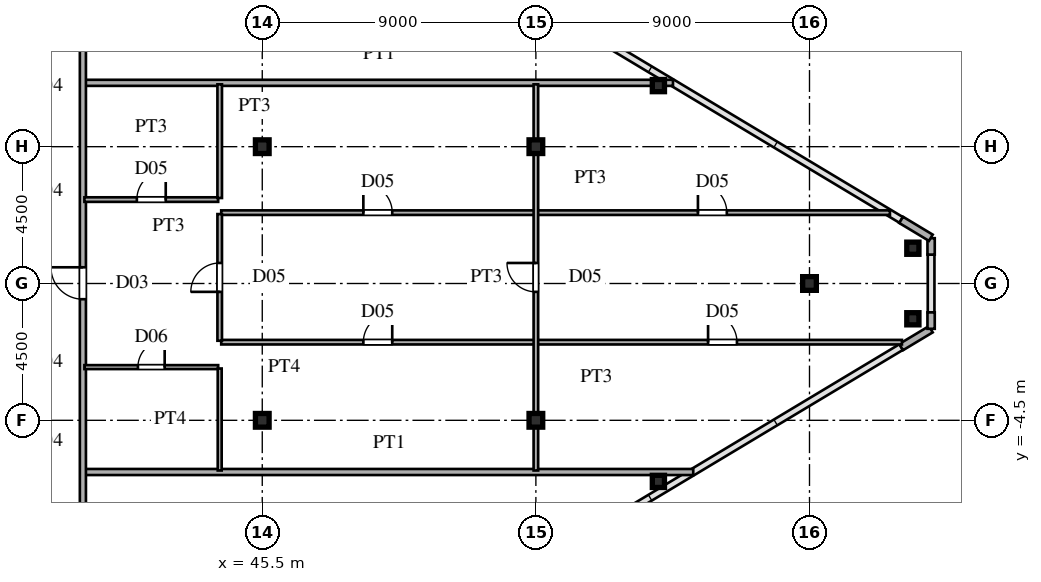
"""IFC4 building model, lengths in metres.
Left out: names, types, materials, properties, quantities, classifications, styles, units other than length and angle.
Written with IfcOpenShell. Run it as: python <this file> out.ifc"""

import sys

from ifc_helpers import new_model, si_unit, direction, frame, frame_2d, origin, origin_2d, place, context, subcontext, project, spatial, rectangle, hollow_rectangle, i_section, extrude, source, transform, mapped, element, fill, save


model = new_model("IFC4")
c1 = context("Model", 3, precision=1e-05, world=origin(), true_north=direction((0.0, 1.0)))
c2 = subcontext(c1, "Body", "Model", "MODEL_VIEW")
j1 = project(units=[si_unit("LENGTHUNIT", "METRE"), si_unit("PLANEANGLEUNIT", "RADIAN")], contexts=[c1])
p1 = place(None, origin())
s1 = spatial("IfcSite", under=j1, at=p1, CompositionType="ELEMENT")
p2 = place(p1, origin())
s2 = spatial("IfcBuilding", under=s1, at=p2, CompositionType="ELEMENT")
p3 = place(p2, frame((0.0, 0.0, 239.4)))
s3 = spatial("IfcBuildingStorey", under=s2, at=p3, CompositionType="ELEMENT", Elevation=239.4)
m1 = source(origin(), c2, "Body", "SweptSolid", [
    extrude(i_section(OverallWidth=0.45, OverallDepth=0.45, WebThickness=0.016, FlangeThickness=0.025, at=origin_2d()), origin(), (0.0, 0.0, 1.0), 3.75),
])
for number, where, z_axis, x_axis in (
    (1, (45.5, -4.5, 0.0), (0.0, 0.0, 1.0), (1.0, 0.0, 0.0)),
    (2, (45.5, 4.5, 0.0), (0.0, 0.0, 1.0), (1.0, 0.0, 0.0)),
    (3, (54.5, -4.5, 0.0), (0.0, 0.0, 1.0), (1.0, 0.0, 0.0)),
    (4, (54.5, 4.5, 0.0), (0.0, 0.0, 1.0), (1.0, 0.0, 0.0)),
    (5, (63.5, 0.0, 0.0), (0.0, 0.0, 1.0), (1.0, 0.0, 0.0)),
):
    element("IfcColumn", number, at=place(p3, frame(where, z_axis=z_axis, x_axis=x_axis)), inside=s3, PredefinedType="COLUMN", context=c2, shape_type="MappedRepresentation", body=[
        mapped(m1, transform((0.0, 0.0, 0.0), scale=1.0)),
    ])
m2 = source(origin(), c2, "Body", "SweptSolid", [
    extrude(hollow_rectangle(XDim=0.4, YDim=0.4, WallThickness=0.016, at=origin_2d()), origin(), (0.0, 0.0, 1.0), 3.75),
])
for number, where, z_axis, x_axis in (
    (6, (66.9, -1.16, 0.0), (0.0, 0.0, 1.0), (1.0, 0.0, 0.0)),
    (7, (66.9, 1.16, 0.0), (0.0, 0.0, 1.0), (1.0, 0.0, 0.0)),
    (8, (58.53, -6.509, 0.0), (0.0, 0.0, 1.0), (1.0, 0.0, 0.0)),
    (9, (58.53, 6.509, 0.0), (0.0, 0.0, 1.0), (1.0, 0.0, 0.0)),
):
    element("IfcColumn", number, at=place(p3, frame(where, z_axis=z_axis, x_axis=x_axis)), inside=s3, PredefinedType="COLUMN", context=c2, shape_type="MappedRepresentation", body=[
        mapped(m2, transform((0.0, 0.0, 0.0), scale=1.0)),
    ])
p4 = place(p3, frame((66.514, -2.092, 0.0), z_axis=(0.0, 0.0, 1.0), x_axis=(0.85743623509, 0.514590228002, 0.0)))
e10 = element("IfcWall", 10, at=p4, inside=s3, PredefinedType="SOLIDWALL", context=c2, shape_type="SweptSolid", body=[
    extrude(rectangle(XDim=1.14, YDim=0.24, at=frame_2d((0.57, 0.0))), origin(), (0.0, 0.0, 1.0), 3.53),
])
for number, where, z_axis, x_axis in (
    (11, (67.5, -1.49, 0.0), (0.0, 0.0, 1.0), (0.0, 1.0, 0.0)),
    (12, (67.5, 0.95, 0.0), (0.0, 0.0, 1.0), (0.0, 1.0, 0.0)),
):
    element("IfcWall", number, at=place(p3, frame(where, z_axis=z_axis, x_axis=x_axis)), inside=s3, PredefinedType="SOLIDWALL", context=c2, shape_type="SweptSolid", body=[
        extrude(rectangle(XDim=0.54, YDim=0.24, at=frame_2d((0.27, 0.0))), origin(), (0.0, 0.0, 1.0), 3.53),
    ])
p5 = place(p3, frame((67.491, 1.505, 0.0), z_axis=(0.0, 0.0, 1.0), x_axis=(-0.85743623509, 0.514590228002, 0.0)))
e13 = element("IfcWall", 13, at=p5, inside=s3, PredefinedType="SOLIDWALL", context=c2, shape_type="SweptSolid", body=[
    extrude(rectangle(XDim=1.14, YDim=0.24, at=frame_2d((0.57, 0.0))), origin(), (0.0, 0.0, 1.0), 3.53),
])
p6 = place(p3, frame((39.68, -6.2, 0.0), z_axis=(0.0, 0.0, 1.0), x_axis=(1.0, 0.0, 0.0)))
e14 = element("IfcWall", 14, at=p6, inside=s3, PredefinedType="PARTITIONING", context=c2, shape_type="SweptSolid", body=[
    extrude(rectangle(XDim=19.996, YDim=0.2, at=frame_2d((9.998, 0.0))), origin(), (0.0, 0.0, 1.0), 3.53),
])
p7 = place(p3, frame((39.65, -2.75, 0.0), z_axis=(0.0, 0.0, 1.0), x_axis=(1.0, 0.0, 0.0)))
e15 = element("IfcWall", 15, at=p7, inside=s3, PredefinedType="PARTITIONING", context=c2, shape_type="SweptSolid", body=[
    extrude(rectangle(XDim=4.4, YDim=0.13, at=frame_2d((2.2, 0.0))), origin(), (0.0, 0.0, 1.0), 3.53),
])
p8 = place(p7, frame((1.76, 0.0, 0.0)))
e16 = element("IfcOpeningElement", 16, at=p8, cuts=e15, PredefinedType="OPENING", context=c2, shape_type="SweptSolid", body=[
    extrude(rectangle(XDim=0.88, YDim=2.1, at=frame_2d((0.44, 1.05))), frame((0.0, 0.075, 0.0), z_axis=(0.0, -1.0, 0.0), x_axis=(1.0, 0.0, 0.0)), (0.0, 0.0, 1.0), 0.15),
])
p9 = place(p3, frame((44.15, -1.93, 0.0), z_axis=(0.0, 0.0, 1.0), x_axis=(1.0, 0.0, 0.0)))
e17 = element("IfcWall", 17, at=p9, inside=s3, PredefinedType="PARTITIONING", context=c2, shape_type="SweptSolid", body=[
    extrude(rectangle(XDim=22.39, YDim=0.15, at=frame_2d((11.195, 0.0))), origin(), (0.0, 0.0, 1.0), 3.53),
])
p10 = place(p9, frame((4.675, 0.0, 0.0)))
e18 = element("IfcOpeningElement", 18, at=p10, cuts=e17, PredefinedType="OPENING", context=c2, shape_type="SweptSolid", body=[
    extrude(rectangle(XDim=0.95, YDim=2.15, at=frame_2d((0.475, 1.075))), frame((0.0, 0.085, 0.0), z_axis=(0.0, -1.0, 0.0), x_axis=(1.0, 0.0, 0.0)), (0.0, 0.0, 1.0), 0.17),
])
p11 = place(p9, frame((16.014, 0.0, 0.0)))
e19 = element("IfcOpeningElement", 19, at=p11, cuts=e17, PredefinedType="OPENING", context=c2, shape_type="SweptSolid", body=[
    extrude(rectangle(XDim=0.95, YDim=2.15, at=frame_2d((0.475, 1.075))), frame((0.0, 0.085, 0.0), z_axis=(0.0, -1.0, 0.0), x_axis=(1.0, 0.0, 0.0)), (0.0, 0.0, 1.0), 0.17),
])
p12 = place(p3, frame((44.15, 2.33, 0.0), z_axis=(0.0, 0.0, 1.0), x_axis=(1.0, 0.0, 0.0)))
e20 = element("IfcWall", 20, at=p12, inside=s3, PredefinedType="PARTITIONING", context=c2, shape_type="SweptSolid", body=[
    extrude(rectangle(XDim=21.996, YDim=0.15, at=frame_2d((10.998, 0.0))), origin(), (0.0, 0.0, 1.0), 3.53),
])
p13 = place(p12, frame((4.675, 0.0, 0.0)))
e21 = element("IfcOpeningElement", 21, at=p13, cuts=e20, PredefinedType="OPENING", context=c2, shape_type="SweptSolid", body=[
    extrude(rectangle(XDim=0.95, YDim=2.15, at=frame_2d((0.475, 1.075))), frame((0.0, 0.085, 0.0), z_axis=(0.0, -1.0, 0.0), x_axis=(1.0, 0.0, 0.0)), (0.0, 0.0, 1.0), 0.17),
])
p14 = place(p12, frame((15.681, 0.0, 0.0)))
e22 = element("IfcOpeningElement", 22, at=p14, cuts=e20, PredefinedType="OPENING", context=c2, shape_type="SweptSolid", body=[
    extrude(rectangle(XDim=0.95, YDim=2.15, at=frame_2d((0.475, 1.075))), frame((0.0, 0.085, 0.0), z_axis=(0.0, -1.0, 0.0), x_axis=(1.0, 0.0, 0.0)), (0.0, 0.0, 1.0), 0.17),
])
p15 = place(p3, frame((39.65, 2.76, 0.0), z_axis=(0.0, 0.0, 1.0), x_axis=(1.0, 0.0, 0.0)))
e23 = element("IfcWall", 23, at=p15, inside=s3, PredefinedType="PARTITIONING", context=c2, shape_type="SweptSolid", body=[
    extrude(rectangle(XDim=4.4, YDim=0.15, at=frame_2d((2.2, 0.0))), origin(), (0.0, 0.0, 1.0), 3.53),
])
p16 = place(p15, frame((1.725, 0.0, 0.0)))
e24 = element("IfcOpeningElement", 24, at=p16, cuts=e23, PredefinedType="OPENING", context=c2, shape_type="SweptSolid", body=[
    extrude(rectangle(XDim=0.95, YDim=2.15, at=frame_2d((0.475, 1.075))), frame((0.0, 0.085, 0.0), z_axis=(0.0, -1.0, 0.0), x_axis=(1.0, 0.0, 0.0)), (0.0, 0.0, 1.0), 0.17),
])
p17 = place(p3, frame((39.68, 6.6, 0.0), z_axis=(0.0, 0.0, 1.0), x_axis=(1.0, 0.0, 0.0)))
e25 = element("IfcWall", 25, at=p17, inside=s3, PredefinedType="PARTITIONING", context=c2, shape_type="SweptSolid", body=[
    extrude(rectangle(XDim=19.33, YDim=0.2, at=frame_2d((9.665, 0.0))), origin(), (0.0, 0.0, 1.0), 3.53),
])
p18 = place(p3, frame((39.6, -15.515, 0.0), z_axis=(0.0, 0.0, 1.0), x_axis=(0.0, 1.0, 0.0)))
e26 = element("IfcWall", 26, at=p18, inside=s3, PredefinedType="PARTITIONING", context=c2, shape_type="SweptSolid", body=[
    extrude(rectangle(XDim=31.03, YDim=0.2, at=frame_2d((15.515, 0.0))), origin(), (0.0, 0.0, 1.0), 3.53),
])
p19 = place(p18, frame((4.09, 0.0, 0.0)))
e27 = element("IfcOpeningElement", 27, at=p19, cuts=e26, PredefinedType="OPENING", context=c2, shape_type="SweptSolid", body=[
    extrude(rectangle(XDim=1.05, YDim=2.25, at=frame_2d((0.525, 1.125))), frame((0.0, 0.11, 0.0), z_axis=(0.0, -1.0, 0.0), x_axis=(1.0, 0.0, 0.0)), (0.0, 0.0, 1.0), 0.22),
])
p20 = place(p18, frame((14.998, 0.0, 0.0)))
e28 = element("IfcOpeningElement", 28, at=p20, cuts=e26, PredefinedType="OPENING", context=c2, shape_type="SweptSolid", body=[
    extrude(rectangle(XDim=1.05, YDim=2.25, at=frame_2d((0.525, 1.125))), frame((0.0, 0.11, 0.0), z_axis=(0.0, -1.0, 0.0), x_axis=(1.0, 0.0, 0.0)), (0.0, 0.0, 1.0), 0.22),
])
p21 = place(p18, frame((26.09, 0.0, 0.0)))
e29 = element("IfcOpeningElement", 29, at=p21, cuts=e26, PredefinedType="OPENING", context=c2, shape_type="SweptSolid", body=[
    extrude(rectangle(XDim=1.05, YDim=2.25, at=frame_2d((0.525, 1.125))), frame((0.0, 0.11, 0.0), z_axis=(0.0, -1.0, 0.0), x_axis=(1.0, 0.0, 0.0)), (0.0, 0.0, 1.0), 0.22),
])
p22 = place(p3, frame((44.1, -6.15, 0.0), z_axis=(0.0, 0.0, 1.0), x_axis=(0.0, 1.0, 0.0)))
e30 = element("IfcWall", 30, at=p22, inside=s3, PredefinedType="PARTITIONING", context=c2, shape_type="SweptSolid", body=[
    extrude(rectangle(XDim=3.354, YDim=0.13, at=frame_2d((1.677, 0.0))), origin(), (0.0, 0.0, 1.0), 3.53),
])
p23 = place(p3, frame((44.1, -1.883, 0.0), z_axis=(0.0, 0.0, 1.0), x_axis=(0.0, 1.0, 0.0)))
e31 = element("IfcWall", 31, at=p23, inside=s3, PredefinedType="PARTITIONING", context=c2, shape_type="SweptSolid", body=[
    extrude(rectangle(XDim=4.166, YDim=0.15, at=frame_2d((2.083, 0.0))), origin(), (0.0, 0.0, 1.0), 3.53),
])
p24 = place(p23, frame((1.608, 0.0, 0.0)))
e32 = element("IfcOpeningElement", 32, at=p24, cuts=e31, PredefinedType="OPENING", context=c2, shape_type="SweptSolid", body=[
    extrude(rectangle(XDim=0.95, YDim=2.15, at=frame_2d((0.475, 1.075))), frame((0.0, 0.085, 0.0), z_axis=(0.0, -1.0, 0.0), x_axis=(1.0, 0.0, 0.0)), (0.0, 0.0, 1.0), 0.17),
])
p25 = place(p3, frame((44.1, 2.812, 0.0), z_axis=(0.0, 0.0, 1.0), x_axis=(0.0, 1.0, 0.0)))
e33 = element("IfcWall", 33, at=p25, inside=s3, PredefinedType="PARTITIONING", context=c2, shape_type="SweptSolid", body=[
    extrude(rectangle(XDim=3.738, YDim=0.15, at=frame_2d((1.869, 0.0))), origin(), (0.0, 0.0, 1.0), 3.53),
])
p26 = place(p3, frame((54.5, -6.15, 0.0), z_axis=(0.0, 0.0, 1.0), x_axis=(0.0, 1.0, 0.0)))
e34 = element("IfcWall", 34, at=p26, inside=s3, PredefinedType="PARTITIONING", context=c2, shape_type="SweptSolid", body=[
    extrude(rectangle(XDim=12.7, YDim=0.15, at=frame_2d((6.35, 0.0))), origin(), (0.0, 0.0, 1.0), 2.93),
])
p27 = place(p26, frame((5.875, 0.0, 0.0)))
e35 = element("IfcOpeningElement", 35, at=p27, cuts=e34, PredefinedType="OPENING", context=c2, shape_type="SweptSolid", body=[
    extrude(rectangle(XDim=0.95, YDim=2.15, at=frame_2d((0.475, 1.075))), frame((0.0, 0.085, 0.0), z_axis=(0.0, -1.0, 0.0), x_axis=(1.0, 0.0, 0.0)), (0.0, 0.0, 1.0), 0.17),
])
m3 = source(origin(), c2, "Body", "SweptSolid", [
    extrude(rectangle(XDim=0.88, YDim=2.1, at=frame_2d((0.44, 1.05))), frame((0.0, 0.025, 0.0), z_axis=(0.0, -1.0, 0.0), x_axis=(1.0, 0.0, 0.0)), (0.0, 0.0, 1.0), 0.05),
])
p28 = place(p8, origin())
e36 = element("IfcDoor", 36, at=p28, inside=s3, OperationType="SINGLE_SWING_RIGHT", PredefinedType="DOOR", context=c2, shape_type="MappedRepresentation", body=[
    mapped(m3, transform((0.0, 0.0, 0.0), scale=1.0)),
])
fill(e16, e36)
m4 = source(origin(), c2, "Body", "SweptSolid", [
    extrude(rectangle(XDim=0.95, YDim=2.15, at=frame_2d((0.475, 1.075))), frame((0.0, 0.025, 0.0), z_axis=(0.0, -1.0, 0.0), x_axis=(1.0, 0.0, 0.0)), (0.0, 0.0, 1.0), 0.05),
])
p29 = place(p10, origin())
e37 = element("IfcDoor", 37, at=p29, inside=s3, OperationType="SINGLE_SWING_RIGHT", PredefinedType="DOOR", context=c2, shape_type="MappedRepresentation", body=[
    mapped(m4, transform((0.0, 0.0, 0.0), scale=1.0)),
])
fill(e18, e37)
p30 = place(p11, origin())
e38 = element("IfcDoor", 38, at=p30, inside=s3, OperationType="SINGLE_SWING_LEFT", PredefinedType="DOOR", context=c2, shape_type="MappedRepresentation", body=[
    mapped(m4, transform((0.0, 0.0, 0.0), scale=1.0)),
])
fill(e19, e38)
p31 = place(p13, origin())
e39 = element("IfcDoor", 39, at=p31, inside=s3, OperationType="SINGLE_SWING_LEFT", PredefinedType="DOOR", context=c2, shape_type="MappedRepresentation", body=[
    mapped(m4, transform((0.0, 0.0, 0.0), scale=1.0)),
])
fill(e21, e39)
p32 = place(p14, origin())
e40 = element("IfcDoor", 40, at=p32, inside=s3, OperationType="SINGLE_SWING_LEFT", PredefinedType="DOOR", context=c2, shape_type="MappedRepresentation", body=[
    mapped(m4, transform((0.0, 0.0, 0.0), scale=1.0)),
])
fill(e22, e40)
p33 = place(p16, origin())
e41 = element("IfcDoor", 41, at=p33, inside=s3, OperationType="SINGLE_SWING_RIGHT", PredefinedType="DOOR", context=c2, shape_type="MappedRepresentation", body=[
    mapped(m4, transform((0.0, 0.0, 0.0), scale=1.0)),
])
fill(e24, e41)
m5 = source(origin(), c2, "Body", "SweptSolid", [
    extrude(rectangle(XDim=1.05, YDim=2.25, at=frame_2d((0.525, 1.125))), frame((0.0, 0.025, 0.0), z_axis=(0.0, -1.0, 0.0), x_axis=(1.0, 0.0, 0.0)), (0.0, 0.0, 1.0), 0.05),
])
p34 = place(p20, origin())
e42 = element("IfcDoor", 42, at=p34, inside=s3, OperationType="SINGLE_SWING_RIGHT", PredefinedType="DOOR", context=c2, shape_type="MappedRepresentation", body=[
    mapped(m5, transform((0.0, 0.0, 0.0), scale=1.0)),
])
fill(e28, e42)
p35 = place(p24, origin())
e43 = element("IfcDoor", 43, at=p35, inside=s3, OperationType="SINGLE_SWING_LEFT", PredefinedType="DOOR", context=c2, shape_type="MappedRepresentation", body=[
    mapped(m4, transform((0.0, 0.0, 0.0), scale=1.0)),
])
fill(e32, e43)
p36 = place(p27, origin())
e44 = element("IfcDoor", 44, at=p36, inside=s3, OperationType="SINGLE_SWING_RIGHT", PredefinedType="DOOR", context=c2, shape_type="MappedRepresentation", body=[
    mapped(m4, transform((0.0, 0.0, 0.0), scale=1.0)),
])
fill(e35, e44)
save(model, sys.argv[1])
